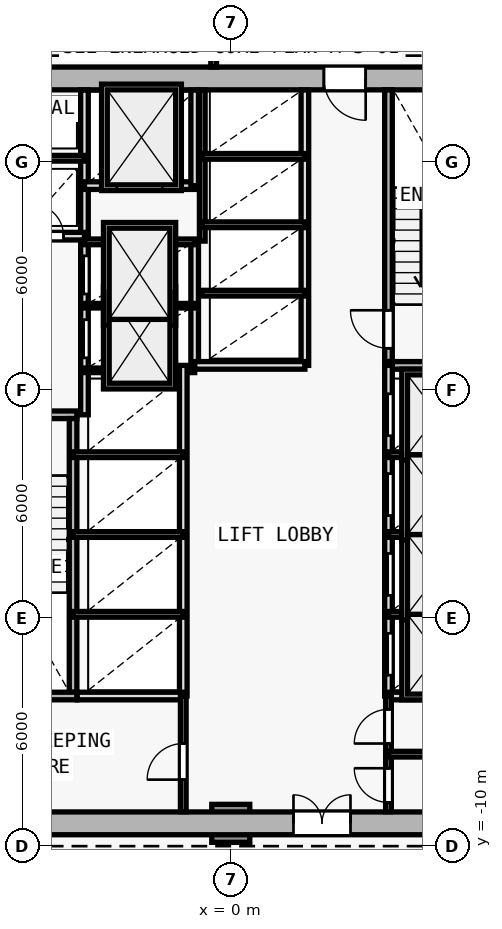
"""IFC4 building model, lengths in metres.
Left out: names, types, materials, properties, quantities, classifications, styles, units other than length and angle.
Written with IfcOpenShell. Run it as: python <this file> out.ifc"""

import sys

from ifc_helpers import new_model, si_unit, direction, frame, frame_2d, origin, origin_2d, place, context, subcontext, project, spatial, rectangle, extrude, element, fill, save


model = new_model("IFC4")
c1 = context("Model", 3, precision=1e-05, world=origin(), true_north=direction((0.0, 1.0)))
c2 = subcontext(c1, "Body", "Model", "MODEL_VIEW")
j1 = project(units=[si_unit("LENGTHUNIT", "METRE"), si_unit("PLANEANGLEUNIT", "RADIAN")], contexts=[c1])
p1 = place(None, origin())
s1 = spatial("IfcSite", under=j1, at=p1, CompositionType="ELEMENT")
p2 = place(p1, origin())
s2 = spatial("IfcBuilding", under=s1, at=p2, CompositionType="ELEMENT")
p3 = place(p2, frame((0.0, 0.0, 17.6)))
s3 = spatial("IfcBuildingStorey", under=s2, at=p3, CompositionType="ELEMENT", Elevation=17.6)
p4 = place(p3, frame((0.0, -9.4, 0.0), z_axis=(0.0, 0.0, 1.0), x_axis=(1.0, 0.0, 0.0)))
e1 = element("IfcColumn", 1, at=p4, inside=s3, PredefinedType="COLUMN", context=c2, shape_type="SweptSolid", body=[
    extrude(rectangle(XDim=1.0, YDim=1.0, at=origin_2d()), origin(), (0.0, 0.0, 1.0), 4.2),
])
p5 = place(p3, frame((-8.0, -9.4, 0.0), z_axis=(0.0, 0.0, 1.0), x_axis=(1.0, 0.0, 0.0)))
e2 = element("IfcWall", 2, at=p5, inside=s3, PredefinedType="SHEAR", context=c2, shape_type="SweptSolid", body=[
    extrude(rectangle(XDim=16.0, YDim=0.6, at=frame_2d((8.0, 0.0))), origin(), (0.0, 0.0, 1.0), 3.88),
])
p6 = place(p5, frame((9.65, 0.0, 0.0)))
e3 = element("IfcOpeningElement", 3, at=p6, cuts=e2, PredefinedType="OPENING", context=c2, shape_type="SweptSolid", body=[
    extrude(rectangle(XDim=1.5, YDim=2.2, at=frame_2d((0.75, 1.1))), frame((0.0, 0.31, 0.0), z_axis=(0.0, -1.0, 0.0), x_axis=(1.0, 0.0, 0.0)), (0.0, 0.0, 1.0), 0.62),
])
p7 = place(p3, frame((8.0, 10.2, 0.0), z_axis=(0.0, 0.0, 1.0), x_axis=(-1.0, 0.0, 0.0)))
e4 = element("IfcWall", 4, at=p7, inside=s3, PredefinedType="SHEAR", context=c2, shape_type="SweptSolid", body=[
    extrude(rectangle(XDim=16.0, YDim=0.6, at=frame_2d((8.0, 0.0))), origin(), (0.0, 0.0, 1.0), 3.88),
])
p8 = place(p7, frame((4.45, 0.0, 0.0)))
e5 = element("IfcOpeningElement", 5, at=p8, cuts=e4, PredefinedType="OPENING", context=c2, shape_type="SweptSolid", body=[
    extrude(rectangle(XDim=1.1, YDim=2.15, at=frame_2d((0.55, 1.075))), frame((0.0, 0.31, 0.0), z_axis=(0.0, -1.0, 0.0), x_axis=(1.0, 0.0, 0.0)), (0.0, 0.0, 1.0), 0.62),
])
p9 = place(p3, frame((-7.4, 1.35, 0.0), z_axis=(0.0, 0.0, 1.0), x_axis=(1.0, 0.0, 0.0)))
e6 = element("IfcWall", 6, at=p9, inside=s3, PredefinedType="SOLIDWALL", context=c2, shape_type="SweptSolid", body=[
    extrude(rectangle(XDim=3.35, YDim=0.2, at=frame_2d((1.675, 0.0))), origin(), (0.0, 0.0, 1.0), 3.88),
])
p10 = place(p9, frame((0.65, 0.0, 0.0)))
e7 = element("IfcOpeningElement", 7, at=p10, cuts=e6, PredefinedType="OPENING", context=c2, shape_type="SweptSolid", body=[
    extrude(rectangle(XDim=1.0, YDim=2.15, at=frame_2d((0.5, 1.075))), frame((0.0, 0.11, 0.0), z_axis=(0.0, -1.0, 0.0), x_axis=(1.0, 0.0, 0.0)), (0.0, 0.0, 1.0), 0.22),
])
p11 = place(p3, frame((-4.15, -5.95, 0.0), z_axis=(0.0, 0.0, 1.0), x_axis=(0.0, 1.0, 0.0)))
e8 = element("IfcWall", 8, at=p11, inside=s3, PredefinedType="SOLIDWALL", context=c2, shape_type="SweptSolid", body=[
    extrude(rectangle(XDim=7.2, YDim=0.2, at=frame_2d((3.6, 0.0))), origin(), (0.0, 0.0, 1.0), 3.88),
])
p12 = place(p3, frame((-3.85, 1.35, 0.0), z_axis=(0.0, 0.0, 1.0), x_axis=(0.0, 1.0, 0.0)))
e9 = element("IfcWall", 9, at=p12, inside=s3, PredefinedType="SOLIDWALL", context=c2, shape_type="SweptSolid", body=[
    extrude(rectangle(XDim=8.545, YDim=0.2, at=frame_2d((4.272, 0.0))), origin(), (0.0, 0.0, 1.0), 3.88),
])
p13 = place(p12, frame((1.5, 0.0, 0.0)))
e10 = element("IfcOpeningElement", 10, at=p13, cuts=e9, PredefinedType="OPENING", context=c2, shape_type="SweptSolid", body=[
    extrude(rectangle(XDim=1.0, YDim=2.15, at=frame_2d((0.5, 1.075))), frame((0.0, 0.11, 0.0), z_axis=(0.0, -1.0, 0.0), x_axis=(1.0, 0.0, 0.0)), (0.0, 0.0, 1.0), 0.22),
])
p14 = place(p12, frame((3.18, 0.0, 0.0)))
e11 = element("IfcOpeningElement", 11, at=p14, cuts=e9, PredefinedType="OPENING", context=c2, shape_type="SweptSolid", body=[
    extrude(rectangle(XDim=1.0, YDim=2.15, at=frame_2d((0.5, 1.075))), frame((0.0, 0.11, 0.0), z_axis=(0.0, -1.0, 0.0), x_axis=(1.0, 0.0, 0.0)), (0.0, 0.0, 1.0), 0.22),
])
p15 = place(p3, frame((-7.395, 6.05, 0.0), z_axis=(0.0, 0.0, 1.0), x_axis=(1.0, 0.0, 0.0)))
e12 = element("IfcWall", 12, at=p15, inside=s3, PredefinedType="SOLIDWALL", context=c2, shape_type="SweptSolid", body=[
    extrude(rectangle(XDim=3.545, YDim=0.2, at=frame_2d((1.772, 0.0))), origin(), (0.0, 0.0, 1.0), 3.88),
])
p16 = place(p15, frame((0.345, 0.0, 0.0)))
e13 = element("IfcOpeningElement", 13, at=p16, cuts=e12, PredefinedType="OPENING", context=c2, shape_type="SweptSolid", body=[
    extrude(rectangle(XDim=0.85, YDim=2.1, at=frame_2d((0.425, 1.05))), frame((0.0, 0.11, 0.0), z_axis=(0.0, -1.0, 0.0), x_axis=(1.0, 0.0, 0.0)), (0.0, 0.0, 1.0), 0.22),
])
p17 = place(p15, frame((2.145, 0.0, 0.0)))
e14 = element("IfcOpeningElement", 14, at=p17, cuts=e12, PredefinedType="OPENING", context=c2, shape_type="SweptSolid", body=[
    extrude(rectangle(XDim=0.85, YDim=2.1, at=frame_2d((0.425, 1.05))), frame((0.0, 0.11, 0.0), z_axis=(0.0, -1.0, 0.0), x_axis=(1.0, 0.0, 0.0)), (0.0, 0.0, 1.0), 0.22),
])
p18 = place(p3, frame((-7.395, 8.1, 0.0), z_axis=(0.0, 0.0, 1.0), x_axis=(1.0, 0.0, 0.0)))
e15 = element("IfcWall", 15, at=p18, inside=s3, PredefinedType="PARTITIONING", context=c2, shape_type="SweptSolid", body=[
    extrude(rectangle(XDim=3.545, YDim=0.15, at=frame_2d((1.772, 0.0))), origin(), (0.0, 0.0, 1.0), 3.88),
])
p19 = place(p3, frame((4.15, 2.75, 0.0), z_axis=(0.0, 0.0, 1.0), x_axis=(0.0, 1.0, 0.0)))
e16 = element("IfcWall", 16, at=p19, inside=s3, PredefinedType="SOLIDWALL", context=c2, shape_type="SweptSolid", body=[
    extrude(rectangle(XDim=7.15, YDim=0.2, at=frame_2d((3.575, 0.0))), origin(), (0.0, 0.0, 1.0), 3.88),
])
p20 = place(p19, frame((0.35, 0.0, 0.0)))
e17 = element("IfcOpeningElement", 17, at=p20, cuts=e16, PredefinedType="OPENING", context=c2, shape_type="SweptSolid", body=[
    extrude(rectangle(XDim=1.0, YDim=2.15, at=frame_2d((0.5, 1.075))), frame((0.0, 0.11, 0.0), z_axis=(0.0, -1.0, 0.0), x_axis=(1.0, 0.0, 0.0)), (0.0, 0.0, 1.0), 0.22),
])
p21 = place(p3, frame((4.05, 2.65, 0.0), z_axis=(0.0, 0.0, 1.0), x_axis=(1.0, 0.0, 0.0)))
e18 = element("IfcWall", 18, at=p21, inside=s3, PredefinedType="SOLIDWALL", context=c2, shape_type="SweptSolid", body=[
    extrude(rectangle(XDim=3.35, YDim=0.2, at=frame_2d((1.675, 0.0))), origin(), (0.0, 0.0, 1.0), 3.88),
])
p22 = place(p3, frame((-0.95, 2.65, 0.0), z_axis=(0.0, 0.0, 1.0), x_axis=(0.0, 1.0, 0.0)))
e19 = element("IfcWall", 19, at=p22, inside=s3, PredefinedType="SOLIDWALL", context=c2, shape_type="SweptSolid", body=[
    extrude(rectangle(XDim=3.27, YDim=0.2, at=frame_2d((1.635, 0.0))), origin(), (0.0, 0.0, 1.0), 3.88),
])
for number, where, z_axis, x_axis in (
    (20, (-3.85, 2.52, 0.0), (0.0, 0.0, 1.0), (1.0, 0.0, 0.0)),
    (21, (-3.85, 4.22, 0.0), (0.0, 0.0, 1.0), (1.0, 0.0, 0.0)),
):
    element("IfcWall", number, at=place(p3, frame(where, z_axis=z_axis, x_axis=x_axis)), inside=s3, PredefinedType="PARTITIONING", context=c2, shape_type="SweptSolid", body=[
        extrude(rectangle(XDim=2.9, YDim=0.12, at=frame_2d((1.45, 0.0))), origin(), (0.0, 0.0, 1.0), 3.88),
    ])
p23 = place(p3, frame((-3.85, 5.9, 0.0), z_axis=(0.0, 0.0, 1.0), x_axis=(1.0, 0.0, 0.0)))
e22 = element("IfcWall", 22, at=p23, inside=s3, PredefinedType="PARTITIONING", context=c2, shape_type="SweptSolid", body=[
    extrude(rectangle(XDim=2.9, YDim=0.15, at=frame_2d((1.45, 0.0))), origin(), (0.0, 0.0, 1.0), 3.88),
])
p24 = place(p3, frame((-3.85, 7.38, 0.0), z_axis=(0.0, 0.0, 1.0), x_axis=(1.0, 0.0, 0.0)))
e23 = element("IfcWall", 23, at=p24, inside=s3, PredefinedType="SOLIDWALL", context=c2, shape_type="SweptSolid", body=[
    extrude(rectangle(XDim=2.9, YDim=0.2, at=frame_2d((1.45, 0.0))), origin(), (0.0, 0.0, 1.0), 3.88),
])
p25 = place(p24, frame((0.85, 0.0, 0.0)))
e24 = element("IfcOpeningElement", 24, at=p25, cuts=e23, PredefinedType="OPENING", context=c2, shape_type="SweptSolid", body=[
    extrude(rectangle(XDim=1.2, YDim=2.2, at=frame_2d((0.6, 1.1))), frame((0.0, 0.11, 0.0), z_axis=(0.0, -1.0, 0.0), x_axis=(1.0, 0.0, 0.0)), (0.0, 0.0, 1.0), 0.22),
])
p26 = place(p3, frame((-0.95, 7.38, 0.0), z_axis=(0.0, 0.0, 1.0), x_axis=(0.0, 1.0, 0.0)))
e25 = element("IfcWall", 25, at=p26, inside=s3, PredefinedType="SOLIDWALL", context=c2, shape_type="SweptSolid", body=[
    extrude(rectangle(XDim=2.515, YDim=0.2, at=frame_2d((1.258, 0.0))), origin(), (0.0, 0.0, 1.0), 3.88),
])
p27 = place(p3, frame((4.15, -6.05, 0.0), z_axis=(0.0, 0.0, 1.0), x_axis=(0.0, 1.0, 0.0)))
e26 = element("IfcWall", 26, at=p27, inside=s3, PredefinedType="SOLIDWALL", context=c2, shape_type="SweptSolid", body=[
    extrude(rectangle(XDim=8.7, YDim=0.2, at=frame_2d((4.35, 0.0))), origin(), (0.0, 0.0, 1.0), 3.88),
])
p28 = place(p27, frame((0.55, 0.0, 0.0)))
e27 = element("IfcOpeningElement", 27, at=p28, cuts=e26, PredefinedType="OPENING", context=c2, shape_type="SweptSolid", body=[
    extrude(rectangle(XDim=1.1, YDim=2.15, at=frame_2d((0.55, 1.075))), frame((0.0, 0.11, 0.0), z_axis=(0.0, -1.0, 0.0), x_axis=(1.0, 0.0, 0.0)), (0.0, 0.0, 1.0), 0.22),
])
p29 = place(p27, frame((2.65, 0.0, 0.0)))
e28 = element("IfcOpeningElement", 28, at=p29, cuts=e26, PredefinedType="OPENING", context=c2, shape_type="SweptSolid", body=[
    extrude(rectangle(XDim=1.1, YDim=2.15, at=frame_2d((0.55, 1.075))), frame((0.0, 0.11, 0.0), z_axis=(0.0, -1.0, 0.0), x_axis=(1.0, 0.0, 0.0)), (0.0, 0.0, 1.0), 0.22),
])
p30 = place(p27, frame((4.75, 0.0, 0.0)))
e29 = element("IfcOpeningElement", 29, at=p30, cuts=e26, PredefinedType="OPENING", context=c2, shape_type="SweptSolid", body=[
    extrude(rectangle(XDim=1.1, YDim=2.15, at=frame_2d((0.55, 1.075))), frame((0.0, 0.11, 0.0), z_axis=(0.0, -1.0, 0.0), x_axis=(1.0, 0.0, 0.0)), (0.0, 0.0, 1.0), 0.22),
])
p31 = place(p27, frame((6.85, 0.0, 0.0)))
e30 = element("IfcOpeningElement", 30, at=p31, cuts=e26, PredefinedType="OPENING", context=c2, shape_type="SweptSolid", body=[
    extrude(rectangle(XDim=1.1, YDim=2.15, at=frame_2d((0.55, 1.075))), frame((0.0, 0.11, 0.0), z_axis=(0.0, -1.0, 0.0), x_axis=(1.0, 0.0, 0.0)), (0.0, 0.0, 1.0), 0.22),
])
for number, where, z_axis, x_axis in (
    (31, (4.15, -3.9, 0.0), (0.0, 0.0, 1.0), (1.0, 0.0, 0.0)),
    (32, (4.15, -1.8, 0.0), (0.0, 0.0, 1.0), (1.0, 0.0, 0.0)),
    (33, (4.15, 0.3, 0.0), (0.0, 0.0, 1.0), (1.0, 0.0, 0.0)),
):
    element("IfcWall", number, at=place(p3, frame(where, z_axis=z_axis, x_axis=x_axis)), inside=s3, PredefinedType="PARTITIONING", context=c2, shape_type="SweptSolid", body=[
        extrude(rectangle(XDim=2.6, YDim=0.15, at=frame_2d((1.3, 0.0))), origin(), (0.0, 0.0, 1.0), 3.88),
    ])
p32 = place(p3, frame((-1.25, -6.05, 0.0), z_axis=(0.0, 0.0, 1.0), x_axis=(0.0, 1.0, 0.0)))
e34 = element("IfcWall", 34, at=p32, inside=s3, PredefinedType="SOLIDWALL", context=c2, shape_type="SweptSolid", body=[
    extrude(rectangle(XDim=8.7, YDim=0.2, at=frame_2d((4.35, 0.0))), origin(), (0.0, 0.0, 1.0), 3.88),
])
for number, where, z_axis, x_axis in (
    (35, (-4.15, -3.9, 0.0), (0.0, 0.0, 1.0), (1.0, 0.0, 0.0)),
    (36, (-4.15, -1.8, 0.0), (0.0, 0.0, 1.0), (1.0, 0.0, 0.0)),
    (37, (-4.15, 0.3, 0.0), (0.0, 0.0, 1.0), (1.0, 0.0, 0.0)),
):
    element("IfcWall", number, at=place(p3, frame(where, z_axis=z_axis, x_axis=x_axis)), inside=s3, PredefinedType="PARTITIONING", context=c2, shape_type="SweptSolid", body=[
        extrude(rectangle(XDim=2.9, YDim=0.15, at=frame_2d((1.45, 0.0))), origin(), (0.0, 0.0, 1.0), 3.88),
    ])
p33 = place(p3, frame((1.95, 2.65, 0.0), z_axis=(0.0, 0.0, 1.0), x_axis=(0.0, 1.0, 0.0)))
e38 = element("IfcWall", 38, at=p33, inside=s3, PredefinedType="SOLIDWALL", context=c2, shape_type="SweptSolid", body=[
    extrude(rectangle(XDim=7.245, YDim=0.2, at=frame_2d((3.623, 0.0))), origin(), (0.0, 0.0, 1.0), 3.88),
])
p34 = place(p3, frame((-0.95, 2.65, 0.0), z_axis=(0.0, 0.0, 1.0), x_axis=(1.0, 0.0, 0.0)))
e39 = element("IfcWall", 39, at=p34, inside=s3, PredefinedType="SOLIDWALL", context=c2, shape_type="SweptSolid", body=[
    extrude(rectangle(XDim=2.9, YDim=0.2, at=frame_2d((1.45, 0.0))), origin(), (0.0, 0.0, 1.0), 3.88),
])
p35 = place(p3, frame((-0.75, 5.92, 0.0), z_axis=(0.0, 0.0, 1.0), x_axis=(0.0, 1.0, 0.0)))
e40 = element("IfcWall", 40, at=p35, inside=s3, PredefinedType="PARTITIONING", context=c2, shape_type="SweptSolid", body=[
    extrude(rectangle(XDim=3.975, YDim=0.15, at=frame_2d((1.988, 0.0))), origin(), (0.0, 0.0, 1.0), 3.88),
])
for number, where, z_axis, x_axis in (
    (41, (-0.75, 4.55, 0.0), (0.0, 0.0, 1.0), (1.0, 0.0, 0.0)),
    (42, (-0.75, 6.35, 0.0), (0.0, 0.0, 1.0), (1.0, 0.0, 0.0)),
    (43, (-0.75, 8.15, 0.0), (0.0, 0.0, 1.0), (1.0, 0.0, 0.0)),
):
    element("IfcWall", number, at=place(p3, frame(where, z_axis=z_axis, x_axis=x_axis)), inside=s3, PredefinedType="PARTITIONING", context=c2, shape_type="SweptSolid", body=[
        extrude(rectangle(XDim=2.7, YDim=0.15, at=frame_2d((1.35, 0.0))), origin(), (0.0, 0.0, 1.0), 3.88),
    ])
p36 = place(p3, frame((-7.4, -6.05, 0.0), z_axis=(0.0, 0.0, 1.0), x_axis=(1.0, 0.0, 0.0)))
e44 = element("IfcWall", 44, at=p36, inside=s3, PredefinedType="SOLIDWALL", context=c2, shape_type="SweptSolid", body=[
    extrude(rectangle(XDim=3.35, YDim=0.2, at=frame_2d((1.675, 0.0))), origin(), (0.0, 0.0, 1.0), 3.88),
])
p37 = place(p3, frame((-4.04, -6.05, 0.0), z_axis=(0.0, 0.0, 1.0), x_axis=(1.0, 0.0, 0.0)))
e45 = element("IfcWall", 45, at=p37, inside=s3, PredefinedType="SOLIDWALL", context=c2, shape_type="SweptSolid", body=[
    extrude(rectangle(XDim=2.79, YDim=0.2, at=frame_2d((1.395, 0.0))), origin(), (0.0, 0.0, 1.0), 3.88),
])
p38 = place(p3, frame((4.15, -6.05, 0.0), z_axis=(0.0, 0.0, 1.0), x_axis=(1.0, 0.0, 0.0)))
e46 = element("IfcWall", 46, at=p38, inside=s3, PredefinedType="SOLIDWALL", context=c2, shape_type="SweptSolid", body=[
    extrude(rectangle(XDim=3.245, YDim=0.2, at=frame_2d((1.623, 0.0))), origin(), (0.0, 0.0, 1.0), 3.88),
])
p39 = place(p3, frame((-1.25, -9.095, 0.0), z_axis=(0.0, 0.0, 1.0), x_axis=(0.0, 1.0, 0.0)))
e47 = element("IfcWall", 47, at=p39, inside=s3, PredefinedType="PARTITIONING", context=c2, shape_type="SweptSolid", body=[
    extrude(rectangle(XDim=3.045, YDim=0.15, at=frame_2d((1.522, 0.0))), origin(), (0.0, 0.0, 1.0), 3.88),
])
p40 = place(p39, frame((0.845, 0.0, 0.0)))
e48 = element("IfcOpeningElement", 48, at=p40, cuts=e47, PredefinedType="OPENING", context=c2, shape_type="SweptSolid", body=[
    extrude(rectangle(XDim=0.95, YDim=2.1, at=frame_2d((0.475, 1.05))), frame((0.0, 0.085, 0.0), z_axis=(0.0, -1.0, 0.0), x_axis=(1.0, 0.0, 0.0)), (0.0, 0.0, 1.0), 0.17),
])
p41 = place(p3, frame((4.15, -9.095, 0.0), z_axis=(0.0, 0.0, 1.0), x_axis=(0.0, 1.0, 0.0)))
e49 = element("IfcWall", 49, at=p41, inside=s3, PredefinedType="PARTITIONING", context=c2, shape_type="SweptSolid", body=[
    extrude(rectangle(XDim=3.045, YDim=0.15, at=frame_2d((1.522, 0.0))), origin(), (0.0, 0.0, 1.0), 3.88),
])
p42 = place(p41, frame((0.245, 0.0, 0.0)))
e50 = element("IfcOpeningElement", 50, at=p42, cuts=e49, PredefinedType="OPENING", context=c2, shape_type="SweptSolid", body=[
    extrude(rectangle(XDim=0.9, YDim=2.1, at=frame_2d((0.45, 1.05))), frame((0.0, 0.085, 0.0), z_axis=(0.0, -1.0, 0.0), x_axis=(1.0, 0.0, 0.0)), (0.0, 0.0, 1.0), 0.17),
])
p43 = place(p41, frame((1.795, 0.0, 0.0)))
e51 = element("IfcOpeningElement", 51, at=p43, cuts=e49, PredefinedType="OPENING", context=c2, shape_type="SweptSolid", body=[
    extrude(rectangle(XDim=0.9, YDim=2.1, at=frame_2d((0.45, 1.05))), frame((0.0, 0.085, 0.0), z_axis=(0.0, -1.0, 0.0), x_axis=(1.0, 0.0, 0.0)), (0.0, 0.0, 1.0), 0.17),
])
p44 = place(p3, frame((4.15, -7.58, 0.0), z_axis=(0.0, 0.0, 1.0), x_axis=(1.0, 0.0, 0.0)))
e52 = element("IfcWall", 52, at=p44, inside=s3, PredefinedType="PARTITIONING", context=c2, shape_type="SweptSolid", body=[
    extrude(rectangle(XDim=3.245, YDim=0.15, at=frame_2d((1.623, 0.0))), origin(), (0.0, 0.0, 1.0), 3.88),
])
p45 = place(p3, frame((-0.45, 10.5, 0.0), z_axis=(0.0, 0.0, 1.0), x_axis=(0.0, 1.0, 0.0)))
e53 = element("IfcWall", 53, at=p45, inside=s3, PredefinedType="PARTITIONING", context=c2, shape_type="SweptSolid", body=[
    extrude(rectangle(XDim=4.75, YDim=0.15, at=frame_2d((2.375, 0.0))), origin(), (0.0, 0.0, 1.0), 3.88),
])
p46 = place(p6, origin())
e54 = element("IfcDoor", 54, at=p46, inside=s3, OperationType="DOUBLE_DOOR_SINGLE_SWING", PredefinedType="DOOR", context=c2, shape_type="SweptSolid", body=[
    extrude(rectangle(XDim=1.5, YDim=2.2, at=frame_2d((0.75, 1.1))), frame((0.0, 0.025, 0.0), z_axis=(0.0, -1.0, 0.0), x_axis=(1.0, 0.0, 0.0)), (0.0, 0.0, 1.0), 0.05),
])
fill(e3, e54)
p47 = place(p8, origin())
e55 = element("IfcDoor", 55, at=p47, inside=s3, OperationType="SINGLE_SWING_LEFT", PredefinedType="DOOR", context=c2, shape_type="SweptSolid", body=[
    extrude(rectangle(XDim=1.1, YDim=2.15, at=frame_2d((0.55, 1.075))), frame((0.0, 0.025, 0.0), z_axis=(0.0, -1.0, 0.0), x_axis=(1.0, 0.0, 0.0)), (0.0, 0.0, 1.0), 0.05),
])
fill(e5, e55)
p48 = place(p17, origin())
e56 = element("IfcDoor", 56, at=p48, inside=s3, OperationType="SINGLE_SWING_LEFT", PredefinedType="DOOR", context=c2, shape_type="SweptSolid", body=[
    extrude(rectangle(XDim=0.85, YDim=2.1, at=frame_2d((0.425, 1.05))), frame((0.0, 0.025, 0.0), z_axis=(0.0, -1.0, 0.0), x_axis=(1.0, 0.0, 0.0)), (0.0, 0.0, 1.0), 0.05),
])
fill(e14, e56)
p49 = place(p20, origin())
e57 = element("IfcDoor", 57, at=p49, inside=s3, OperationType="SINGLE_SWING_RIGHT", PredefinedType="DOOR", context=c2, shape_type="SweptSolid", body=[
    extrude(rectangle(XDim=1.0, YDim=2.15, at=frame_2d((0.5, 1.075))), frame((0.0, 0.025, 0.0), z_axis=(0.0, -1.0, 0.0), x_axis=(1.0, 0.0, 0.0)), (0.0, 0.0, 1.0), 0.05),
])
fill(e17, e57)
p50 = place(p25, origin())
e58 = element("IfcDoor", 58, at=p50, inside=s3, OperationType="DOUBLE_DOOR_SLIDING", PredefinedType="DOOR", context=c2, shape_type="SweptSolid", body=[
    extrude(rectangle(XDim=1.2, YDim=2.2, at=frame_2d((0.6, 1.1))), frame((0.0, 0.025, 0.0), z_axis=(0.0, -1.0, 0.0), x_axis=(1.0, 0.0, 0.0)), (0.0, 0.0, 1.0), 0.05),
])
fill(e24, e58)
p51 = place(p28, origin())
e59 = element("IfcDoor", 59, at=p51, inside=s3, OperationType="DOUBLE_DOOR_SLIDING", PredefinedType="DOOR", context=c2, shape_type="SweptSolid", body=[
    extrude(rectangle(XDim=1.1, YDim=2.15, at=frame_2d((0.55, 1.075))), frame((0.0, 0.025, 0.0), z_axis=(0.0, -1.0, 0.0), x_axis=(1.0, 0.0, 0.0)), (0.0, 0.0, 1.0), 0.05),
])
fill(e27, e59)
p52 = place(p29, origin())
e60 = element("IfcDoor", 60, at=p52, inside=s3, OperationType="DOUBLE_DOOR_SLIDING", PredefinedType="DOOR", context=c2, shape_type="SweptSolid", body=[
    extrude(rectangle(XDim=1.1, YDim=2.15, at=frame_2d((0.55, 1.075))), frame((0.0, 0.025, 0.0), z_axis=(0.0, -1.0, 0.0), x_axis=(1.0, 0.0, 0.0)), (0.0, 0.0, 1.0), 0.05),
])
fill(e28, e60)
p53 = place(p30, origin())
e61 = element("IfcDoor", 61, at=p53, inside=s3, OperationType="DOUBLE_DOOR_SLIDING", PredefinedType="DOOR", context=c2, shape_type="SweptSolid", body=[
    extrude(rectangle(XDim=1.1, YDim=2.15, at=frame_2d((0.55, 1.075))), frame((0.0, 0.025, 0.0), z_axis=(0.0, -1.0, 0.0), x_axis=(1.0, 0.0, 0.0)), (0.0, 0.0, 1.0), 0.05),
])
fill(e29, e61)
p54 = place(p31, origin())
e62 = element("IfcDoor", 62, at=p54, inside=s3, OperationType="DOUBLE_DOOR_SLIDING", PredefinedType="DOOR", context=c2, shape_type="SweptSolid", body=[
    extrude(rectangle(XDim=1.1, YDim=2.15, at=frame_2d((0.55, 1.075))), frame((0.0, 0.025, 0.0), z_axis=(0.0, -1.0, 0.0), x_axis=(1.0, 0.0, 0.0)), (0.0, 0.0, 1.0), 0.05),
])
fill(e30, e62)
p55 = place(p13, origin())
e63 = element("IfcDoor", 63, at=p55, inside=s3, OperationType="DOUBLE_DOOR_SLIDING", PredefinedType="DOOR", context=c2, shape_type="SweptSolid", body=[
    extrude(rectangle(XDim=1.0, YDim=2.15, at=frame_2d((0.5, 1.075))), frame((0.0, 0.025, 0.0), z_axis=(0.0, -1.0, 0.0), x_axis=(1.0, 0.0, 0.0)), (0.0, 0.0, 1.0), 0.05),
])
fill(e10, e63)
p56 = place(p14, origin())
e64 = element("IfcDoor", 64, at=p56, inside=s3, OperationType="DOUBLE_DOOR_SLIDING", PredefinedType="DOOR", context=c2, shape_type="SweptSolid", body=[
    extrude(rectangle(XDim=1.0, YDim=2.15, at=frame_2d((0.5, 1.075))), frame((0.0, 0.025, 0.0), z_axis=(0.0, -1.0, 0.0), x_axis=(1.0, 0.0, 0.0)), (0.0, 0.0, 1.0), 0.05),
])
fill(e11, e64)
p57 = place(p40, origin())
e65 = element("IfcDoor", 65, at=p57, inside=s3, OperationType="SINGLE_SWING_LEFT", PredefinedType="DOOR", context=c2, shape_type="SweptSolid", body=[
    extrude(rectangle(XDim=0.95, YDim=2.1, at=frame_2d((0.475, 1.05))), frame((0.0, 0.025, 0.0), z_axis=(0.0, -1.0, 0.0), x_axis=(1.0, 0.0, 0.0)), (0.0, 0.0, 1.0), 0.05),
])
fill(e48, e65)
p58 = place(p42, origin())
e66 = element("IfcDoor", 66, at=p58, inside=s3, OperationType="SINGLE_SWING_RIGHT", PredefinedType="DOOR", context=c2, shape_type="SweptSolid", body=[
    extrude(rectangle(XDim=0.9, YDim=2.1, at=frame_2d((0.45, 1.05))), frame((0.0, 0.025, 0.0), z_axis=(0.0, -1.0, 0.0), x_axis=(1.0, 0.0, 0.0)), (0.0, 0.0, 1.0), 0.05),
])
fill(e50, e66)
p59 = place(p43, origin())
e67 = element("IfcDoor", 67, at=p59, inside=s3, OperationType="SINGLE_SWING_LEFT", PredefinedType="DOOR", context=c2, shape_type="SweptSolid", body=[
    extrude(rectangle(XDim=0.9, YDim=2.1, at=frame_2d((0.45, 1.05))), frame((0.0, 0.025, 0.0), z_axis=(0.0, -1.0, 0.0), x_axis=(1.0, 0.0, 0.0)), (0.0, 0.0, 1.0), 0.05),
])
fill(e51, e67)
save(model, sys.argv[1])
